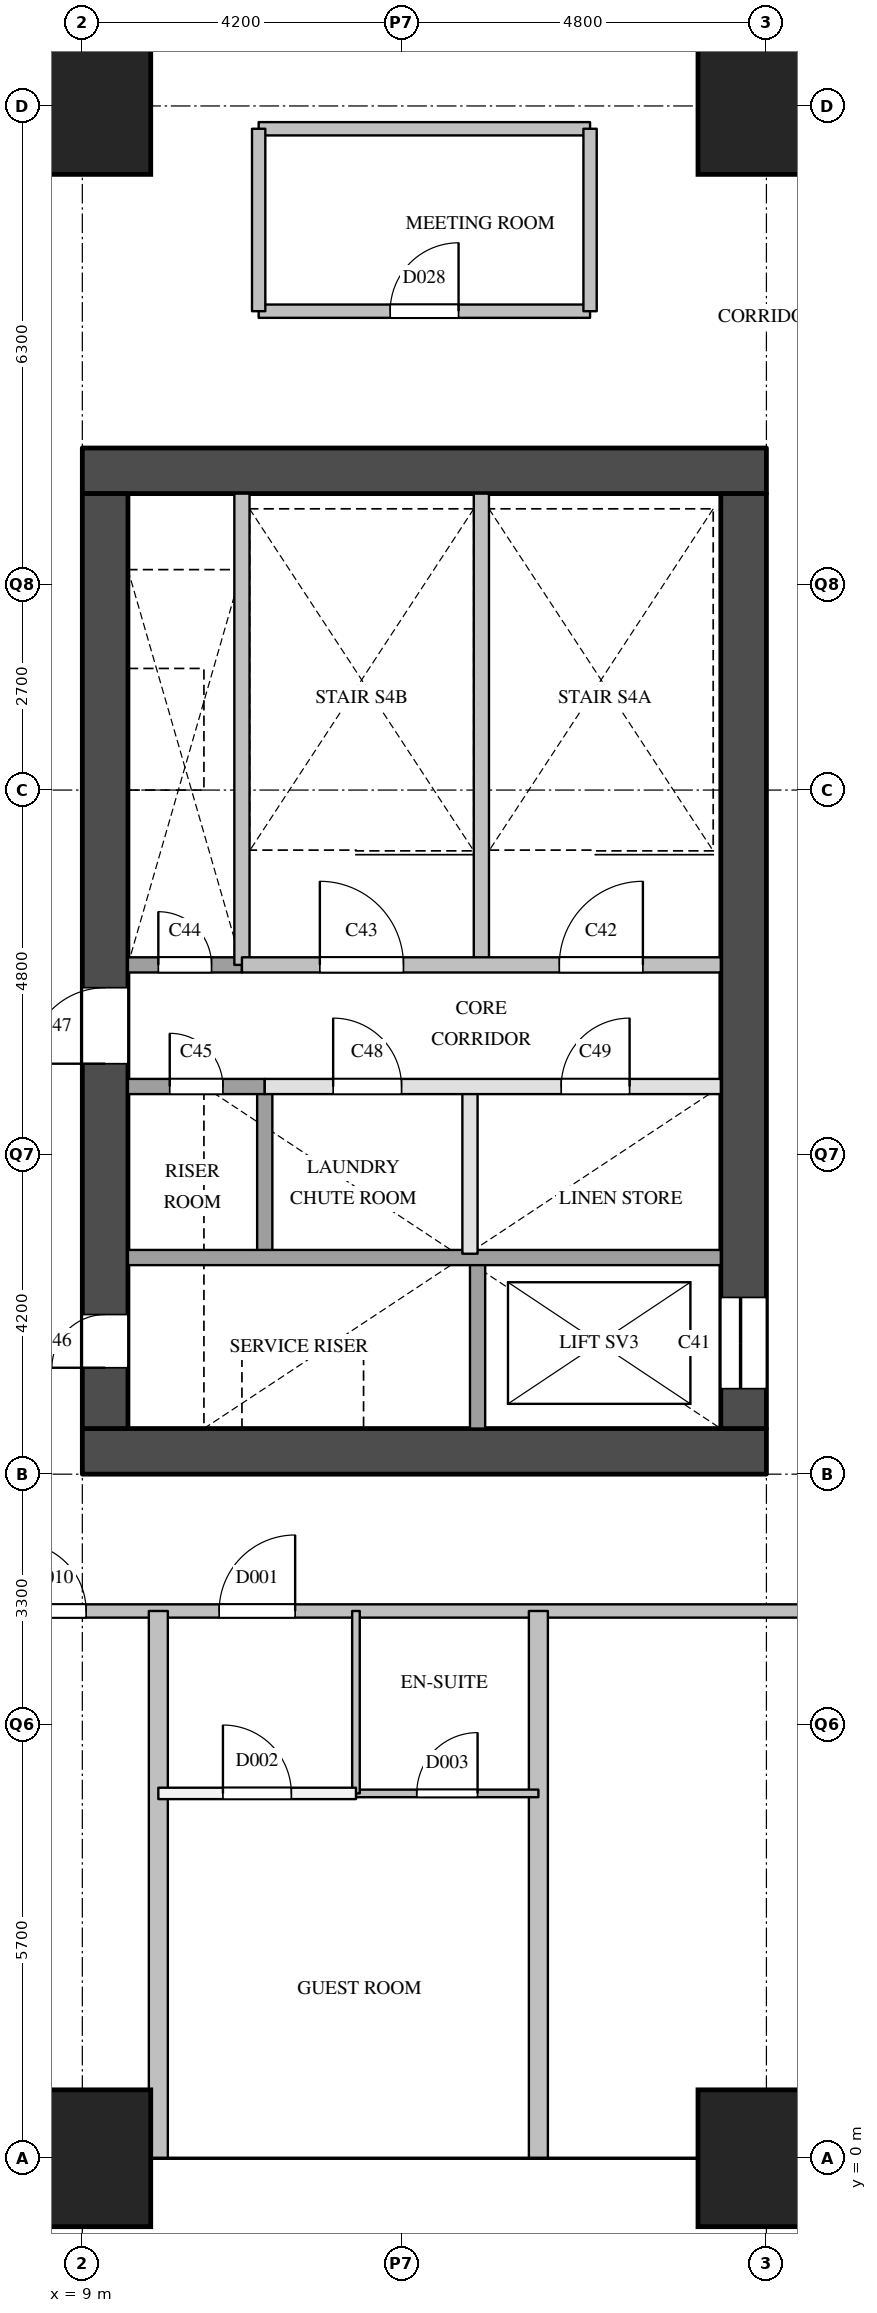
"""IFC4 building model, lengths in metres.
Left out: names, types, materials, properties, quantities, classifications, styles, units other than length and angle.
Written with IfcOpenShell. Run it as: python <this file> out.ifc"""

import sys

from ifc_helpers import new_model, si_unit, direction, frame, frame_2d, origin, origin_2d, place, context, subcontext, project, spatial, rectangle, extrude, element, fill, save


model = new_model("IFC4")
c1 = context("Model", 3, precision=1e-05, world=origin(), true_north=direction((0.0, 1.0)))
c2 = subcontext(c1, "Body", "Model", "MODEL_VIEW")
j1 = project(units=[si_unit("LENGTHUNIT", "METRE"), si_unit("PLANEANGLEUNIT", "RADIAN")], contexts=[c1])
p1 = place(None, origin())
s1 = spatial("IfcSite", under=j1, at=p1, CompositionType="ELEMENT")
p2 = place(p1, origin())
s2 = spatial("IfcBuilding", under=s1, at=p2, CompositionType="ELEMENT")
p3 = place(p2, frame((0.0, 0.0, 72.8)))
s3 = spatial("IfcBuildingStorey", under=s2, at=p3, CompositionType="ELEMENT", Elevation=72.8)
for number, where, z_axis, x_axis in (
    (1, (9.0, 0.0, 0.0), (0.0, 0.0, 1.0), (1.0, 0.0, 0.0)),
    (2, (9.0, 27.0, 0.0), (0.0, 0.0, 1.0), (1.0, 0.0, 0.0)),
    (3, (18.0, 0.0, 0.0), (0.0, 0.0, 1.0), (1.0, 0.0, 0.0)),
    (4, (18.0, 27.0, 0.0), (0.0, 0.0, 1.0), (1.0, 0.0, 0.0)),
):
    element("IfcColumn", number, at=place(p3, frame(where, z_axis=z_axis, x_axis=x_axis)), inside=s3, PredefinedType="COLUMN", context=c2, shape_type="SweptSolid", body=[
        extrude(rectangle(XDim=1.8, YDim=1.8, at=origin_2d()), origin(), (0.0, 0.0, 1.0), 5.0),
    ])
for number, where, z_axis, x_axis in (
    (5, (9.0, 9.3, 0.0), (0.0, 0.0, 1.0), (1.0, 0.0, 0.0)),
    (6, (9.0, 22.2, 0.0), (0.0, 0.0, 1.0), (1.0, 0.0, 0.0)),
):
    element("IfcWall", number, at=place(p3, frame(where, z_axis=z_axis, x_axis=x_axis)), inside=s3, PredefinedType="SHEAR", context=c2, shape_type="SweptSolid", body=[
        extrude(rectangle(XDim=9.0, YDim=0.6, at=frame_2d((4.5, 0.0))), origin(), (0.0, 0.0, 1.0), 4.7),
    ])
p4 = place(p3, frame((9.3, 9.6, 0.0), z_axis=(0.0, 0.0, 1.0), x_axis=(0.0, 1.0, 0.0)))
e7 = element("IfcWall", 7, at=p4, inside=s3, PredefinedType="SHEAR", context=c2, shape_type="SweptSolid", body=[
    extrude(rectangle(XDim=12.3, YDim=0.6, at=frame_2d((6.15, 0.0))), origin(), (0.0, 0.0, 1.0), 4.7),
])
p5 = place(p4, frame((0.8, 0.0, 0.0)))
e8 = element("IfcOpeningElement", 8, at=p5, cuts=e7, PredefinedType="OPENING", context=c2, shape_type="SweptSolid", body=[
    extrude(rectangle(XDim=0.7, YDim=2.1, at=frame_2d((0.35, 1.05))), frame((0.0, 0.31, 0.0), z_axis=(0.0, -1.0, 0.0), x_axis=(1.0, 0.0, 0.0)), (0.0, 0.0, 1.0), 0.62),
])
p6 = place(p4, frame((4.8, 0.0, 0.0)))
e9 = element("IfcOpeningElement", 9, at=p6, cuts=e7, PredefinedType="OPENING", context=c2, shape_type="SweptSolid", body=[
    extrude(rectangle(XDim=1.0, YDim=2.1, at=frame_2d((0.5, 1.05))), frame((0.0, 0.31, 0.0), z_axis=(0.0, -1.0, 0.0), x_axis=(1.0, 0.0, 0.0)), (0.0, 0.0, 1.0), 0.62),
])
p7 = place(p3, frame((17.7, 9.6, 0.0), z_axis=(0.0, 0.0, 1.0), x_axis=(0.0, 1.0, 0.0)))
e10 = element("IfcWall", 10, at=p7, inside=s3, PredefinedType="SHEAR", context=c2, shape_type="SweptSolid", body=[
    extrude(rectangle(XDim=12.3, YDim=0.6, at=frame_2d((6.15, 0.0))), origin(), (0.0, 0.0, 1.0), 4.7),
])
p8 = place(p7, frame((0.525, 0.0, 0.0)))
e11 = element("IfcOpeningElement", 11, at=p8, cuts=e10, PredefinedType="OPENING", context=c2, shape_type="SweptSolid", body=[
    extrude(rectangle(XDim=1.2, YDim=2.1, at=frame_2d((0.6, 1.05))), frame((0.0, 0.31, 0.0), z_axis=(0.0, -1.0, 0.0), x_axis=(1.0, 0.0, 0.0)), (0.0, 0.0, 1.0), 0.62),
])
p9 = place(p3, frame((11.1, 15.7, 0.0), z_axis=(0.0, 0.0, 1.0), x_axis=(0.0, 1.0, 0.0)))
e12 = element("IfcWall", 12, at=p9, inside=s3, PredefinedType="SOLIDWALL", context=c2, shape_type="SweptSolid", body=[
    extrude(rectangle(XDim=6.2, YDim=0.2, at=frame_2d((3.1, 0.0))), origin(), (0.0, 0.0, 1.0), 4.7),
])
p10 = place(p3, frame((11.4, 11.9, 0.0), z_axis=(0.0, 0.0, 1.0), x_axis=(0.0, 1.0, 0.0)))
e13 = element("IfcWall", 13, at=p10, inside=s3, PredefinedType="SOLIDWALL", context=c2, shape_type="SweptSolid", body=[
    extrude(rectangle(XDim=2.2, YDim=0.2, at=frame_2d((1.1, 0.0))), origin(), (0.0, 0.0, 1.0), 4.7),
])
p11 = place(p3, frame((14.1, 11.9, 0.0), z_axis=(0.0, 0.0, 1.0), x_axis=(0.0, 1.0, 0.0)))
e14 = element("IfcWall", 14, at=p11, inside=s3, PredefinedType="PARTITIONING", context=c2, shape_type="SweptSolid", body=[
    extrude(rectangle(XDim=2.2, YDim=0.2, at=frame_2d((1.1, 0.0))), origin(), (0.0, 0.0, 1.0), 4.7),
])
p12 = place(p3, frame((14.2, 9.6, 0.0), z_axis=(0.0, 0.0, 1.0), x_axis=(0.0, 1.0, 0.0)))
e15 = element("IfcWall", 15, at=p12, inside=s3, PredefinedType="SOLIDWALL", context=c2, shape_type="SweptSolid", body=[
    extrude(rectangle(XDim=2.3, YDim=0.2, at=frame_2d((1.15, 0.0))), origin(), (0.0, 0.0, 1.0), 4.7),
])
p13 = place(p3, frame((14.25, 15.7, 0.0), z_axis=(0.0, 0.0, 1.0), x_axis=(0.0, 1.0, 0.0)))
e16 = element("IfcWall", 16, at=p13, inside=s3, PredefinedType="SOLIDWALL", context=c2, shape_type="SweptSolid", body=[
    extrude(rectangle(XDim=6.2, YDim=0.2, at=frame_2d((3.1, 0.0))), origin(), (0.0, 0.0, 1.0), 4.7),
])
p14 = place(p3, frame((9.6, 11.85, 0.0), z_axis=(0.0, 0.0, 1.0), x_axis=(1.0, 0.0, 0.0)))
e17 = element("IfcWall", 17, at=p14, inside=s3, PredefinedType="SOLIDWALL", context=c2, shape_type="SweptSolid", body=[
    extrude(rectangle(XDim=7.8, YDim=0.2, at=frame_2d((3.9, 0.0))), origin(), (0.0, 0.0, 1.0), 4.7),
])
p15 = place(p3, frame((11.4, 14.1, 0.0), z_axis=(0.0, 0.0, 1.0), x_axis=(1.0, 0.0, 0.0)))
e18 = element("IfcWall", 18, at=p15, inside=s3, PredefinedType="PARTITIONING", context=c2, shape_type="SweptSolid", body=[
    extrude(rectangle(XDim=6.0, YDim=0.2, at=frame_2d((3.0, 0.0))), origin(), (0.0, 0.0, 1.0), 4.7),
])
p16 = place(p15, frame((0.9, 0.0, 0.0)))
e19 = element("IfcOpeningElement", 19, at=p16, cuts=e18, PredefinedType="OPENING", context=c2, shape_type="SweptSolid", body=[
    extrude(rectangle(XDim=0.9, YDim=2.1, at=frame_2d((0.45, 1.05))), frame((0.0, 0.11, 0.0), z_axis=(0.0, -1.0, 0.0), x_axis=(1.0, 0.0, 0.0)), (0.0, 0.0, 1.0), 0.22),
])
p17 = place(p15, frame((3.9, 0.0, 0.0)))
e20 = element("IfcOpeningElement", 20, at=p17, cuts=e18, PredefinedType="OPENING", context=c2, shape_type="SweptSolid", body=[
    extrude(rectangle(XDim=0.9, YDim=2.1, at=frame_2d((0.45, 1.05))), frame((0.0, 0.11, 0.0), z_axis=(0.0, -1.0, 0.0), x_axis=(1.0, 0.0, 0.0)), (0.0, 0.0, 1.0), 0.22),
])
p18 = place(p3, frame((9.6, 14.1, 0.0), z_axis=(0.0, 0.0, 1.0), x_axis=(1.0, 0.0, 0.0)))
e21 = element("IfcWall", 21, at=p18, inside=s3, PredefinedType="SOLIDWALL", context=c2, shape_type="SweptSolid", body=[
    extrude(rectangle(XDim=1.8, YDim=0.2, at=frame_2d((0.9, 0.0))), origin(), (0.0, 0.0, 1.0), 4.7),
])
p19 = place(p18, frame((0.55, 0.0, 0.0)))
e22 = element("IfcOpeningElement", 22, at=p19, cuts=e21, PredefinedType="OPENING", context=c2, shape_type="SweptSolid", body=[
    extrude(rectangle(XDim=0.7, YDim=2.1, at=frame_2d((0.35, 1.05))), frame((0.0, 0.11, 0.0), z_axis=(0.0, -1.0, 0.0), x_axis=(1.0, 0.0, 0.0)), (0.0, 0.0, 1.0), 0.22),
])
p20 = place(p3, frame((9.6, 15.7, 0.0), z_axis=(0.0, 0.0, 1.0), x_axis=(1.0, 0.0, 0.0)))
e23 = element("IfcWall", 23, at=p20, inside=s3, PredefinedType="SOLIDWALL", context=c2, shape_type="SweptSolid", body=[
    extrude(rectangle(XDim=1.5, YDim=0.2, at=frame_2d((0.75, 0.0))), origin(), (0.0, 0.0, 1.0), 4.7),
])
p21 = place(p20, frame((0.4, 0.0, 0.0)))
e24 = element("IfcOpeningElement", 24, at=p21, cuts=e23, PredefinedType="OPENING", context=c2, shape_type="SweptSolid", body=[
    extrude(rectangle(XDim=0.7, YDim=2.1, at=frame_2d((0.35, 1.05))), frame((0.0, 0.11, 0.0), z_axis=(0.0, -1.0, 0.0), x_axis=(1.0, 0.0, 0.0)), (0.0, 0.0, 1.0), 0.22),
])
p22 = place(p3, frame((11.1, 15.7, 0.0), z_axis=(0.0, 0.0, 1.0), x_axis=(1.0, 0.0, 0.0)))
e25 = element("IfcWall", 25, at=p22, inside=s3, PredefinedType="SOLIDWALL", context=c2, shape_type="SweptSolid", body=[
    extrude(rectangle(XDim=6.3, YDim=0.2, at=frame_2d((3.15, 0.0))), origin(), (0.0, 0.0, 1.0), 4.7),
])
p23 = place(p22, frame((4.175, 0.0, 0.0)))
e26 = element("IfcOpeningElement", 26, at=p23, cuts=e25, PredefinedType="OPENING", context=c2, shape_type="SweptSolid", body=[
    extrude(rectangle(XDim=1.1, YDim=2.1, at=frame_2d((0.55, 1.05))), frame((0.0, 0.11, 0.0), z_axis=(0.0, -1.0, 0.0), x_axis=(1.0, 0.0, 0.0)), (0.0, 0.0, 1.0), 0.22),
])
p24 = place(p22, frame((1.025, 0.0, 0.0)))
e27 = element("IfcOpeningElement", 27, at=p24, cuts=e25, PredefinedType="OPENING", context=c2, shape_type="SweptSolid", body=[
    extrude(rectangle(XDim=1.1, YDim=2.1, at=frame_2d((0.55, 1.05))), frame((0.0, 0.11, 0.0), z_axis=(0.0, -1.0, 0.0), x_axis=(1.0, 0.0, 0.0)), (0.0, 0.0, 1.0), 0.22),
])
p25 = place(p3, frame((7.2, 7.2, 0.0), z_axis=(0.0, 0.0, 1.0), x_axis=(1.0, 0.0, 0.0)))
e28 = element("IfcWall", 28, at=p25, inside=s3, PredefinedType="PARTITIONING", context=c2, shape_type="SweptSolid", body=[
    extrude(rectangle(XDim=12.6, YDim=0.175, at=frame_2d((6.3, 0.0))), origin(), (0.0, 0.0, 1.0), 4.7),
])
p26 = place(p25, frame((3.6, 0.0, 0.0)))
e29 = element("IfcOpeningElement", 29, at=p26, cuts=e28, PredefinedType="OPENING", context=c2, shape_type="SweptSolid", body=[
    extrude(rectangle(XDim=1.0, YDim=2.1, at=frame_2d((0.5, 1.05))), frame((0.0, 0.097, 0.0), z_axis=(0.0, -1.0, 0.0), x_axis=(1.0, 0.0, 0.0)), (0.0, 0.0, 1.0), 0.195),
])
p27 = place(p25, frame((0.95, 0.0, 0.0)))
e30 = element("IfcOpeningElement", 30, at=p27, cuts=e28, PredefinedType="OPENING", context=c2, shape_type="SweptSolid", body=[
    extrude(rectangle(XDim=0.9, YDim=2.1, at=frame_2d((0.45, 1.05))), frame((0.0, 0.097, 0.0), z_axis=(0.0, -1.0, 0.0), x_axis=(1.0, 0.0, 0.0)), (0.0, 0.0, 1.0), 0.195),
])
p28 = place(p3, frame((11.32, 24.3, 0.0), z_axis=(0.0, 0.0, 1.0), x_axis=(1.0, 0.0, 0.0)))
e31 = element("IfcWall", 31, at=p28, inside=s3, PredefinedType="PARTITIONING", context=c2, shape_type="SweptSolid", body=[
    extrude(rectangle(XDim=4.36, YDim=0.175, at=frame_2d((2.18, 0.0))), origin(), (0.0, 0.0, 1.0), 4.7),
])
p29 = place(p28, frame((1.73, 0.0, 0.0)))
e32 = element("IfcOpeningElement", 32, at=p29, cuts=e31, PredefinedType="OPENING", context=c2, shape_type="SweptSolid", body=[
    extrude(rectangle(XDim=0.9, YDim=2.1, at=frame_2d((0.45, 1.05))), frame((0.0, 0.097, 0.0), z_axis=(0.0, -1.0, 0.0), x_axis=(1.0, 0.0, 0.0)), (0.0, 0.0, 1.0), 0.195),
])
p30 = place(p3, frame((11.32, 26.7, 0.0), z_axis=(0.0, 0.0, 1.0), x_axis=(1.0, 0.0, 0.0)))
e33 = element("IfcWall", 33, at=p30, inside=s3, PredefinedType="PARTITIONING", context=c2, shape_type="SweptSolid", body=[
    extrude(rectangle(XDim=4.36, YDim=0.175, at=frame_2d((2.18, 0.0))), origin(), (0.0, 0.0, 1.0), 3.59),
])
for number, where, z_axis, x_axis in (
    (34, (11.32, 24.3, 0.0), (0.0, 0.0, 1.0), (0.0, 1.0, 0.0)),
    (35, (15.68, 24.3, 0.0), (0.0, 0.0, 1.0), (0.0, 1.0, 0.0)),
):
    element("IfcWall", number, at=place(p3, frame(where, z_axis=z_axis, x_axis=x_axis)), inside=s3, PredefinedType="PARTITIONING", context=c2, shape_type="SweptSolid", body=[
        extrude(rectangle(XDim=2.4, YDim=0.175, at=frame_2d((1.2, 0.0))), origin(), (0.0, 0.0, 1.0), 3.59),
    ])
p31 = place(p3, frame((10.0, 4.8, 0.0), z_axis=(0.0, 0.0, 1.0), x_axis=(1.0, 0.0, 0.0)))
e36 = element("IfcWall", 36, at=p31, inside=s3, PredefinedType="PARTITIONING", context=c2, shape_type="SweptSolid", body=[
    extrude(rectangle(XDim=2.6, YDim=0.15, at=frame_2d((1.3, 0.0))), origin(), (0.0, 0.0, 1.0), 4.7),
])
p32 = place(p31, frame((0.85, 0.0, 0.0)))
e37 = element("IfcOpeningElement", 37, at=p32, cuts=e36, PredefinedType="OPENING", context=c2, shape_type="SweptSolid", body=[
    extrude(rectangle(XDim=0.9, YDim=2.1, at=frame_2d((0.45, 1.05))), frame((0.0, 0.085, 0.0), z_axis=(0.0, -1.0, 0.0), x_axis=(1.0, 0.0, 0.0)), (0.0, 0.0, 1.0), 0.17),
])
for number, where, z_axis, x_axis in (
    (38, (10.0, 0.0, 0.0), (0.0, 0.0, 1.0), (0.0, 1.0, 0.0)),
    (39, (15.0, 0.0, 0.0), (0.0, 0.0, 1.0), (0.0, 1.0, 0.0)),
):
    element("IfcWall", number, at=place(p3, frame(where, z_axis=z_axis, x_axis=x_axis)), inside=s3, PredefinedType="PARTITIONING", context=c2, shape_type="SweptSolid", body=[
        extrude(rectangle(XDim=7.2, YDim=0.25, at=frame_2d((3.6, 0.0))), origin(), (0.0, 0.0, 1.0), 3.59),
    ])
p33 = place(p3, frame((12.6, 4.8, 0.0), z_axis=(0.0, 0.0, 1.0), x_axis=(1.0, 0.0, 0.0)))
e40 = element("IfcWall", 40, at=p33, inside=s3, PredefinedType="PARTITIONING", context=c2, shape_type="SweptSolid", body=[
    extrude(rectangle(XDim=2.4, YDim=0.1, at=frame_2d((1.2, 0.0))), origin(), (0.0, 0.0, 1.0), 4.7),
])
p34 = place(p33, frame((0.8, 0.0, 0.0)))
e41 = element("IfcOpeningElement", 41, at=p34, cuts=e40, PredefinedType="OPENING", context=c2, shape_type="SweptSolid", body=[
    extrude(rectangle(XDim=0.8, YDim=2.1, at=frame_2d((0.4, 1.05))), frame((0.0, 0.06, 0.0), z_axis=(0.0, -1.0, 0.0), x_axis=(1.0, 0.0, 0.0)), (0.0, 0.0, 1.0), 0.12),
])
p35 = place(p3, frame((12.6, 4.8, 0.0), z_axis=(0.0, 0.0, 1.0), x_axis=(0.0, 1.0, 0.0)))
e42 = element("IfcWall", 42, at=p35, inside=s3, PredefinedType="PARTITIONING", context=c2, shape_type="SweptSolid", body=[
    extrude(rectangle(XDim=2.4, YDim=0.1, at=frame_2d((1.2, 0.0))), origin(), (0.0, 0.0, 1.0), 4.7),
])
p36 = place(p8, origin())
e43 = element("IfcDoor", 43, at=p36, inside=s3, OperationType="SLIDING_TO_LEFT", PredefinedType="DOOR", context=c2, shape_type="SweptSolid", body=[
    extrude(rectangle(XDim=1.2, YDim=2.1, at=frame_2d((0.6, 1.05))), frame((0.0, 0.025, 0.0), z_axis=(0.0, -1.0, 0.0), x_axis=(1.0, 0.0, 0.0)), (0.0, 0.0, 1.0), 0.05),
])
fill(e11, e43)
p37 = place(p23, origin())
e44 = element("IfcDoor", 44, at=p37, inside=s3, OperationType="SINGLE_SWING_RIGHT", PredefinedType="DOOR", context=c2, shape_type="SweptSolid", body=[
    extrude(rectangle(XDim=1.1, YDim=2.1, at=frame_2d((0.55, 1.05))), frame((0.0, 0.025, 0.0), z_axis=(0.0, -1.0, 0.0), x_axis=(1.0, 0.0, 0.0)), (0.0, 0.0, 1.0), 0.05),
])
fill(e26, e44)
p38 = place(p24, origin())
e45 = element("IfcDoor", 45, at=p38, inside=s3, OperationType="SINGLE_SWING_LEFT", PredefinedType="DOOR", context=c2, shape_type="SweptSolid", body=[
    extrude(rectangle(XDim=1.1, YDim=2.1, at=frame_2d((0.55, 1.05))), frame((0.0, 0.025, 0.0), z_axis=(0.0, -1.0, 0.0), x_axis=(1.0, 0.0, 0.0)), (0.0, 0.0, 1.0), 0.05),
])
fill(e27, e45)
p39 = place(p21, origin())
e46 = element("IfcDoor", 46, at=p39, inside=s3, OperationType="SINGLE_SWING_LEFT", PredefinedType="DOOR", context=c2, shape_type="SweptSolid", body=[
    extrude(rectangle(XDim=0.7, YDim=2.1, at=frame_2d((0.35, 1.05))), frame((0.0, 0.025, 0.0), z_axis=(0.0, -1.0, 0.0), x_axis=(1.0, 0.0, 0.0)), (0.0, 0.0, 1.0), 0.05),
])
fill(e24, e46)
p40 = place(p19, origin())
e47 = element("IfcDoor", 47, at=p40, inside=s3, OperationType="SINGLE_SWING_LEFT", PredefinedType="DOOR", context=c2, shape_type="SweptSolid", body=[
    extrude(rectangle(XDim=0.7, YDim=2.1, at=frame_2d((0.35, 1.05))), frame((0.0, 0.025, 0.0), z_axis=(0.0, -1.0, 0.0), x_axis=(1.0, 0.0, 0.0)), (0.0, 0.0, 1.0), 0.05),
])
fill(e22, e47)
p41 = place(p5, origin())
e48 = element("IfcDoor", 48, at=p41, inside=s3, OperationType="SINGLE_SWING_LEFT", PredefinedType="DOOR", context=c2, shape_type="SweptSolid", body=[
    extrude(rectangle(XDim=0.7, YDim=2.1, at=frame_2d((0.35, 1.05))), frame((0.0, 0.025, 0.0), z_axis=(0.0, -1.0, 0.0), x_axis=(1.0, 0.0, 0.0)), (0.0, 0.0, 1.0), 0.05),
])
fill(e8, e48)
p42 = place(p6, origin())
e49 = element("IfcDoor", 49, at=p42, inside=s3, OperationType="SINGLE_SWING_LEFT", PredefinedType="DOOR", context=c2, shape_type="SweptSolid", body=[
    extrude(rectangle(XDim=1.0, YDim=2.1, at=frame_2d((0.5, 1.05))), frame((0.0, 0.025, 0.0), z_axis=(0.0, -1.0, 0.0), x_axis=(1.0, 0.0, 0.0)), (0.0, 0.0, 1.0), 0.05),
])
fill(e9, e49)
p43 = place(p16, origin())
e50 = element("IfcDoor", 50, at=p43, inside=s3, OperationType="SINGLE_SWING_LEFT", PredefinedType="DOOR", context=c2, shape_type="SweptSolid", body=[
    extrude(rectangle(XDim=0.9, YDim=2.1, at=frame_2d((0.45, 1.05))), frame((0.0, 0.025, 0.0), z_axis=(0.0, -1.0, 0.0), x_axis=(1.0, 0.0, 0.0)), (0.0, 0.0, 1.0), 0.05),
])
fill(e19, e50)
p44 = place(p17, origin())
e51 = element("IfcDoor", 51, at=p44, inside=s3, OperationType="SINGLE_SWING_RIGHT", PredefinedType="DOOR", context=c2, shape_type="SweptSolid", body=[
    extrude(rectangle(XDim=0.9, YDim=2.1, at=frame_2d((0.45, 1.05))), frame((0.0, 0.025, 0.0), z_axis=(0.0, -1.0, 0.0), x_axis=(1.0, 0.0, 0.0)), (0.0, 0.0, 1.0), 0.05),
])
fill(e20, e51)
p45 = place(p26, origin())
e52 = element("IfcDoor", 52, at=p45, inside=s3, OperationType="SINGLE_SWING_RIGHT", PredefinedType="DOOR", context=c2, shape_type="SweptSolid", body=[
    extrude(rectangle(XDim=1.0, YDim=2.1, at=frame_2d((0.5, 1.05))), frame((0.0, 0.025, 0.0), z_axis=(0.0, -1.0, 0.0), x_axis=(1.0, 0.0, 0.0)), (0.0, 0.0, 1.0), 0.05),
])
fill(e29, e52)
p46 = place(p32, origin())
e53 = element("IfcDoor", 53, at=p46, inside=s3, OperationType="SINGLE_SWING_LEFT", PredefinedType="DOOR", context=c2, shape_type="SweptSolid", body=[
    extrude(rectangle(XDim=0.9, YDim=2.1, at=frame_2d((0.45, 1.05))), frame((0.0, 0.025, 0.0), z_axis=(0.0, -1.0, 0.0), x_axis=(1.0, 0.0, 0.0)), (0.0, 0.0, 1.0), 0.05),
])
fill(e37, e53)
p47 = place(p34, origin())
e54 = element("IfcDoor", 54, at=p47, inside=s3, OperationType="SINGLE_SWING_RIGHT", PredefinedType="DOOR", context=c2, shape_type="SweptSolid", body=[
    extrude(rectangle(XDim=0.8, YDim=2.1, at=frame_2d((0.4, 1.05))), frame((0.0, 0.025, 0.0), z_axis=(0.0, -1.0, 0.0), x_axis=(1.0, 0.0, 0.0)), (0.0, 0.0, 1.0), 0.05),
])
fill(e41, e54)
p48 = place(p27, origin())
e55 = element("IfcDoor", 55, at=p48, inside=s3, OperationType="SINGLE_SWING_LEFT", PredefinedType="DOOR", context=c2, shape_type="SweptSolid", body=[
    extrude(rectangle(XDim=0.9, YDim=2.1, at=frame_2d((0.45, 1.05))), frame((0.0, 0.025, 0.0), z_axis=(0.0, -1.0, 0.0), x_axis=(1.0, 0.0, 0.0)), (0.0, 0.0, 1.0), 0.05),
])
fill(e30, e55)
p49 = place(p29, origin())
e56 = element("IfcDoor", 56, at=p49, inside=s3, OperationType="SINGLE_SWING_RIGHT", PredefinedType="DOOR", context=c2, shape_type="SweptSolid", body=[
    extrude(rectangle(XDim=0.9, YDim=2.1, at=frame_2d((0.45, 1.05))), frame((0.0, 0.025, 0.0), z_axis=(0.0, -1.0, 0.0), x_axis=(1.0, 0.0, 0.0)), (0.0, 0.0, 1.0), 0.05),
])
fill(e32, e56)
save(model, sys.argv[1])
